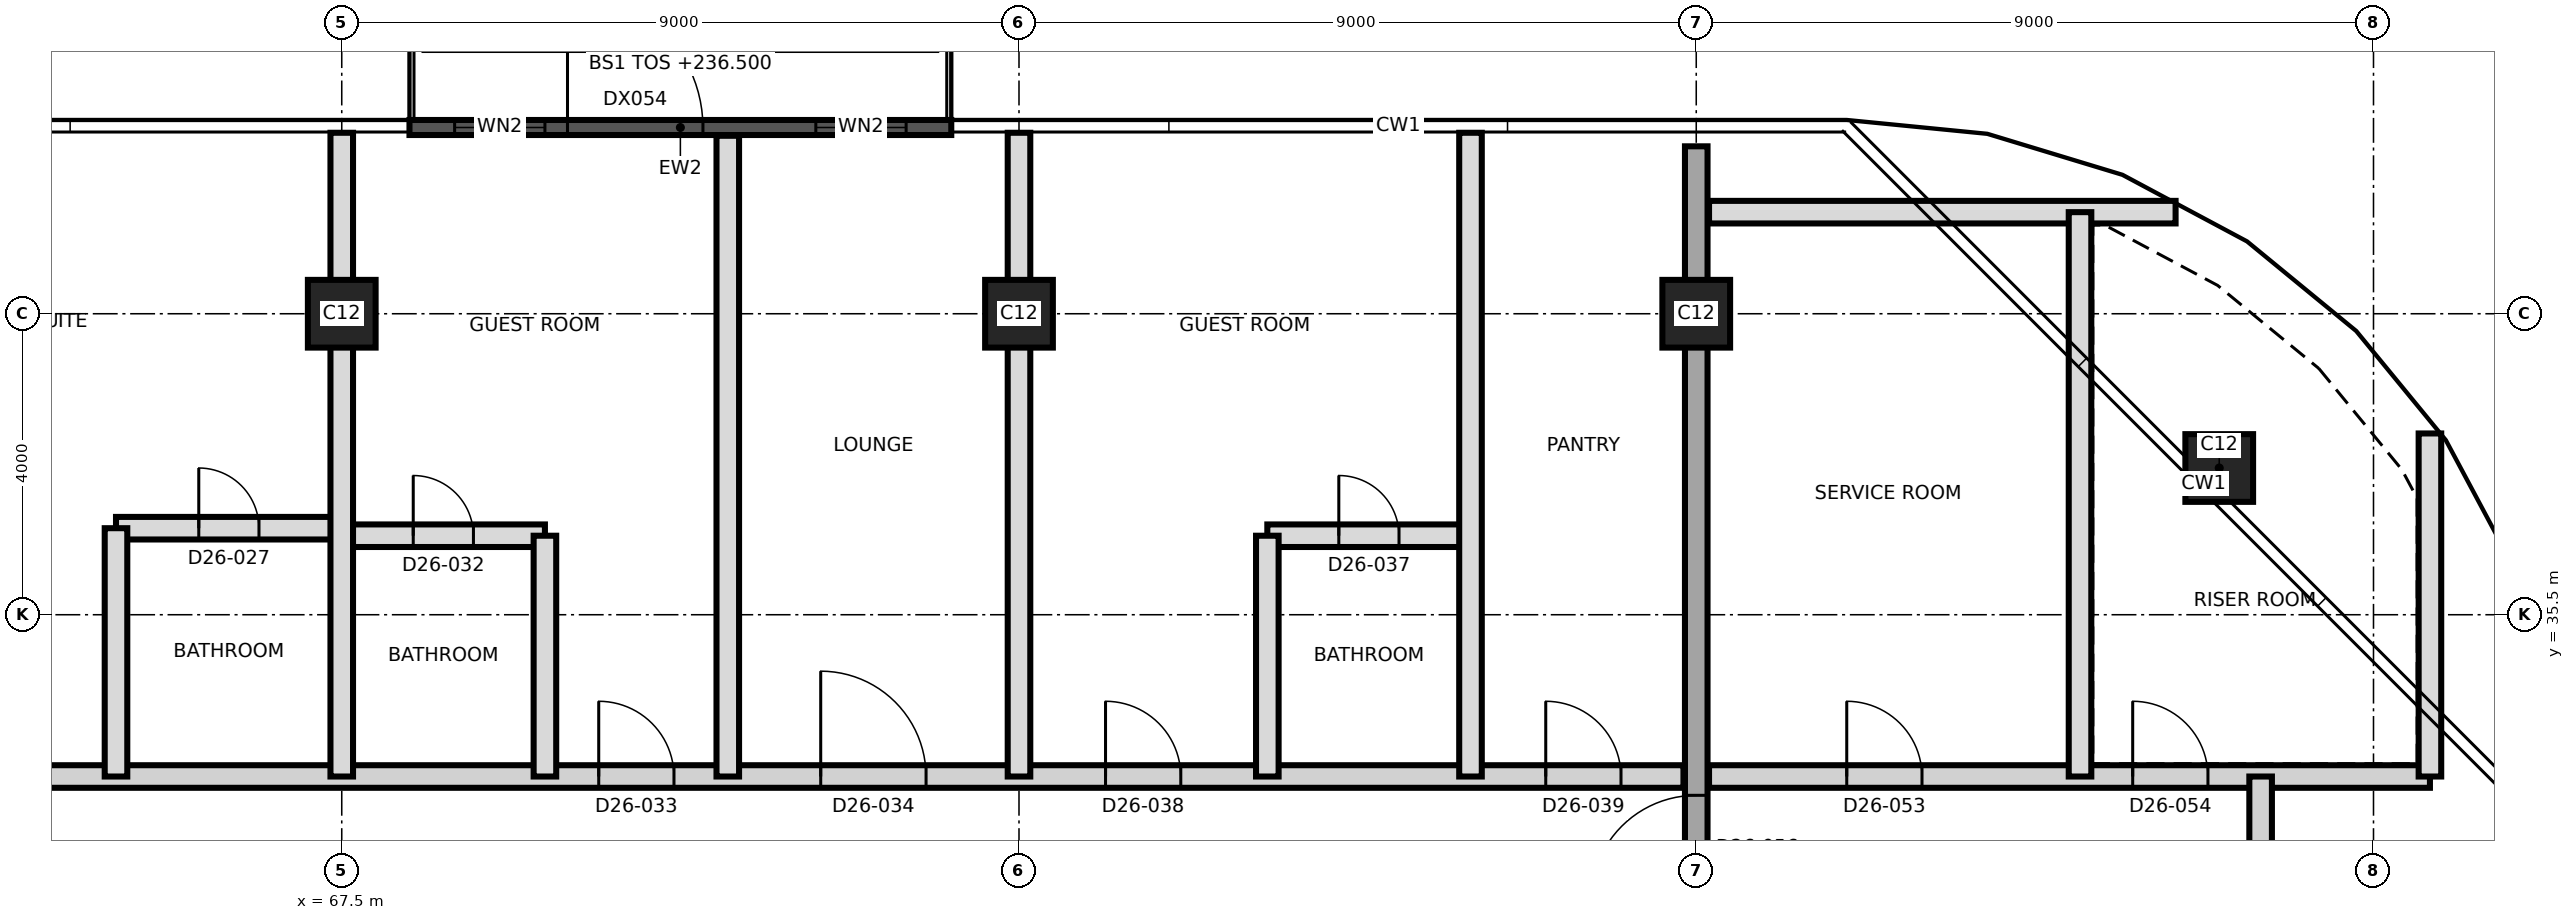
"""IFC4 building model, lengths in metres.
Left out: names, types, materials, properties, quantities, classifications, styles, units other than length and angle.
Written with IfcOpenShell. Run it as: python <this file> out.ifc"""

import sys

from ifc_helpers import new_model, si_unit, direction, frame, frame_2d, origin, origin_2d, place, context, subcontext, project, spatial, rectangle, extrude, element, fill, save


model = new_model("IFC4")
c1 = context("Model", 3, precision=1e-05, world=origin(), true_north=direction((0.0, 1.0)))
c2 = subcontext(c1, "Body", "Model", "MODEL_VIEW")
j1 = project(units=[si_unit("LENGTHUNIT", "METRE"), si_unit("PLANEANGLEUNIT", "RADIAN")], contexts=[c1])
p1 = place(None, origin())
s1 = spatial("IfcSite", under=j1, at=p1, CompositionType="ELEMENT")
p2 = place(p1, origin())
s2 = spatial("IfcBuilding", under=s1, at=p2, CompositionType="ELEMENT")
p3 = place(p2, frame((0.0, 0.0, 236.5)))
s3 = spatial("IfcBuildingStorey", under=s2, at=p3, CompositionType="ELEMENT", Elevation=236.5)
for number, where, z_axis, x_axis in (
    (1, (92.45, 37.45, 0.0), (0.0, 0.0, 1.0), (1.0, 0.0, 0.0)),
    (2, (67.5, 39.5, 0.0), (0.0, 0.0, 1.0), (1.0, 0.0, 0.0)),
    (3, (76.5, 39.5, 0.0), (0.0, 0.0, 1.0), (1.0, 0.0, 0.0)),
    (4, (85.5, 39.5, 0.0), (0.0, 0.0, 1.0), (1.0, 0.0, 0.0)),
):
    element("IfcColumn", number, at=place(p3, frame(where, z_axis=z_axis, x_axis=x_axis)), inside=s3, PredefinedType="COLUMN", context=c2, shape_type="SweptSolid", body=[
        extrude(rectangle(XDim=0.9, YDim=0.9, at=origin_2d()), origin(), (0.0, 0.0, 1.0), 3.7),
    ])
p4 = place(p3, frame((85.5, 19.275, 0.0), z_axis=(0.0, 0.0, 1.0), x_axis=(0.0, 1.0, 0.0)))
e5 = element("IfcWall", 5, at=p4, inside=s3, PredefinedType="SHEAR", context=c2, shape_type="SweptSolid", body=[
    extrude(rectangle(XDim=22.45, YDim=0.3, at=frame_2d((11.225, 0.0))), origin(), (0.0, 0.0, 1.0), 3.7),
])
p5 = place(p4, frame((12.425, 0.0, 0.0)))
e6 = element("IfcOpeningElement", 6, at=p5, cuts=e5, PredefinedType="OPENING", context=c2, shape_type="SweptSolid", body=[
    extrude(rectangle(XDim=1.4, YDim=2.1, at=frame_2d((0.7, 1.05))), frame((0.0, 0.16, 0.0), z_axis=(0.0, -1.0, 0.0), x_axis=(1.0, 0.0, 0.0)), (0.0, 0.0, 1.0), 0.32),
])
p6 = place(p3, frame((68.4, 41.975, 0.0), z_axis=(0.0, 0.0, 1.0), x_axis=(1.0, 0.0, 0.0)))
e7 = element("IfcWall", 7, at=p6, inside=s3, PredefinedType="SOLIDWALL", context=c2, shape_type="SweptSolid", body=[
    extrude(rectangle(XDim=7.2, YDim=0.2, at=frame_2d((3.6, 0.0))), origin(), (0.0, 0.0, 1.0), 3.4),
])
p7 = place(p6, frame((2.1, 0.0, 0.0)))
e8 = element("IfcOpeningElement", 8, at=p7, cuts=e7, PredefinedType="OPENING", context=c2, shape_type="SweptSolid", body=[
    extrude(rectangle(XDim=1.8, YDim=2.4, at=frame_2d((0.9, 1.2))), frame((0.0, 0.11, 0.0), z_axis=(0.0, -1.0, 0.0), x_axis=(1.0, 0.0, 0.0)), (0.0, 0.0, 1.0), 0.22),
])
p8 = place(p6, frame((5.4, 0.0, 0.9)))
e9 = element("IfcOpeningElement", 9, at=p8, cuts=e7, PredefinedType="OPENING", context=c2, shape_type="SweptSolid", body=[
    extrude(rectangle(XDim=1.2, YDim=2.1, at=frame_2d((0.6, 1.05))), frame((0.0, 0.11, 0.0), z_axis=(0.0, -1.0, 0.0), x_axis=(1.0, 0.0, 0.0)), (0.0, 0.0, 1.0), 0.22),
])
p9 = place(p6, frame((0.6, 0.0, 0.9)))
e10 = element("IfcOpeningElement", 10, at=p9, cuts=e7, PredefinedType="OPENING", context=c2, shape_type="SweptSolid", body=[
    extrude(rectangle(XDim=1.2, YDim=2.1, at=frame_2d((0.6, 1.05))), frame((0.0, 0.11, 0.0), z_axis=(0.0, -1.0, 0.0), x_axis=(1.0, 0.0, 0.0)), (0.0, 0.0, 1.0), 0.22),
])
p10 = place(p3, frame((58.55, 33.35, 0.0), z_axis=(0.0, 0.0, 1.0), x_axis=(1.0, 0.0, 0.0)))
e11 = element("IfcWall", 11, at=p10, inside=s3, PredefinedType="PARTITIONING", context=c2, shape_type="SweptSolid", body=[
    extrude(rectangle(XDim=26.78, YDim=0.3, at=frame_2d((13.39, 0.0))), origin(), (0.0, 0.0, 1.0), 3.4),
])
p11 = place(p10, frame((3.95, 0.0, 0.0)))
e12 = element("IfcOpeningElement", 12, at=p11, cuts=e11, PredefinedType="OPENING", context=c2, shape_type="SweptSolid", body=[
    extrude(rectangle(XDim=1.0, YDim=2.4, at=frame_2d((0.5, 1.2))), frame((0.0, 0.16, 0.0), z_axis=(0.0, -1.0, 0.0), x_axis=(1.0, 0.0, 0.0)), (0.0, 0.0, 1.0), 0.32),
])
p12 = place(p10, frame((12.365, 0.0, 0.0)))
e13 = element("IfcOpeningElement", 13, at=p12, cuts=e11, PredefinedType="OPENING", context=c2, shape_type="SweptSolid", body=[
    extrude(rectangle(XDim=1.0, YDim=2.1, at=frame_2d((0.5, 1.05))), frame((0.0, 0.16, 0.0), z_axis=(0.0, -1.0, 0.0), x_axis=(1.0, 0.0, 0.0)), (0.0, 0.0, 1.0), 0.32),
])
p13 = place(p10, frame((15.315, 0.0, 0.0)))
e14 = element("IfcOpeningElement", 14, at=p13, cuts=e11, PredefinedType="OPENING", context=c2, shape_type="SweptSolid", body=[
    extrude(rectangle(XDim=1.4, YDim=2.1, at=frame_2d((0.7, 1.05))), frame((0.0, 0.16, 0.0), z_axis=(0.0, -1.0, 0.0), x_axis=(1.0, 0.0, 0.0)), (0.0, 0.0, 1.0), 0.32),
])
p14 = place(p10, frame((19.1, 0.0, 0.0)))
e15 = element("IfcOpeningElement", 15, at=p14, cuts=e11, PredefinedType="OPENING", context=c2, shape_type="SweptSolid", body=[
    extrude(rectangle(XDim=1.0, YDim=2.1, at=frame_2d((0.5, 1.05))), frame((0.0, 0.16, 0.0), z_axis=(0.0, -1.0, 0.0), x_axis=(1.0, 0.0, 0.0)), (0.0, 0.0, 1.0), 0.32),
])
p15 = place(p10, frame((24.95, 0.0, 0.0)))
e16 = element("IfcOpeningElement", 16, at=p15, cuts=e11, PredefinedType="OPENING", context=c2, shape_type="SweptSolid", body=[
    extrude(rectangle(XDim=1.0, YDim=2.1, at=frame_2d((0.5, 1.05))), frame((0.0, 0.16, 0.0), z_axis=(0.0, -1.0, 0.0), x_axis=(1.0, 0.0, 0.0)), (0.0, 0.0, 1.0), 0.32),
])
p16 = place(p3, frame((85.67, 33.35, 0.0), z_axis=(0.0, 0.0, 1.0), x_axis=(1.0, 0.0, 0.0)))
e17 = element("IfcWall", 17, at=p16, inside=s3, PredefinedType="PARTITIONING", context=c2, shape_type="SweptSolid", body=[
    extrude(rectangle(XDim=9.58, YDim=0.3, at=frame_2d((4.79, 0.0))), origin(), (0.0, 0.0, 1.0), 3.4),
])
p17 = place(p16, frame((1.83, 0.0, 0.0)))
e18 = element("IfcOpeningElement", 18, at=p17, cuts=e17, PredefinedType="OPENING", context=c2, shape_type="SweptSolid", body=[
    extrude(rectangle(XDim=1.0, YDim=2.1, at=frame_2d((0.5, 1.05))), frame((0.0, 0.16, 0.0), z_axis=(0.0, -1.0, 0.0), x_axis=(1.0, 0.0, 0.0)), (0.0, 0.0, 1.0), 0.32),
])
p18 = place(p16, frame((5.63, 0.0, 0.0)))
e19 = element("IfcOpeningElement", 19, at=p18, cuts=e17, PredefinedType="OPENING", context=c2, shape_type="SweptSolid", body=[
    extrude(rectangle(XDim=1.0, YDim=2.1, at=frame_2d((0.5, 1.05))), frame((0.0, 0.16, 0.0), z_axis=(0.0, -1.0, 0.0), x_axis=(1.0, 0.0, 0.0)), (0.0, 0.0, 1.0), 0.32),
])
p19 = place(p3, frame((67.5, 36.55, 0.0), z_axis=(0.0, 0.0, 1.0), x_axis=(1.0, 0.0, 0.0)))
e20 = element("IfcWall", 20, at=p19, inside=s3, PredefinedType="PARTITIONING", context=c2, shape_type="SweptSolid", body=[
    extrude(rectangle(XDim=2.7, YDim=0.3, at=frame_2d((1.35, 0.0))), origin(), (0.0, 0.0, 1.0), 3.4),
])
p20 = place(p19, frame((0.95, 0.0, 0.0)))
e21 = element("IfcOpeningElement", 21, at=p20, cuts=e20, PredefinedType="OPENING", context=c2, shape_type="SweptSolid", body=[
    extrude(rectangle(XDim=0.8, YDim=2.1, at=frame_2d((0.4, 1.05))), frame((0.0, 0.16, 0.0), z_axis=(0.0, -1.0, 0.0), x_axis=(1.0, 0.0, 0.0)), (0.0, 0.0, 1.0), 0.32),
])
p21 = place(p3, frame((79.8, 36.55, 0.0), z_axis=(0.0, 0.0, 1.0), x_axis=(1.0, 0.0, 0.0)))
e22 = element("IfcWall", 22, at=p21, inside=s3, PredefinedType="PARTITIONING", context=c2, shape_type="SweptSolid", body=[
    extrude(rectangle(XDim=2.7, YDim=0.3, at=frame_2d((1.35, 0.0))), origin(), (0.0, 0.0, 1.0), 3.4),
])
p22 = place(p21, frame((0.95, 0.0, 0.0)))
e23 = element("IfcOpeningElement", 23, at=p22, cuts=e22, PredefinedType="OPENING", context=c2, shape_type="SweptSolid", body=[
    extrude(rectangle(XDim=0.8, YDim=2.1, at=frame_2d((0.4, 1.05))), frame((0.0, 0.16, 0.0), z_axis=(0.0, -1.0, 0.0), x_axis=(1.0, 0.0, 0.0)), (0.0, 0.0, 1.0), 0.32),
])
p23 = place(p3, frame((64.5, 36.65, 0.0), z_axis=(0.0, 0.0, 1.0), x_axis=(1.0, 0.0, 0.0)))
e24 = element("IfcWall", 24, at=p23, inside=s3, PredefinedType="PARTITIONING", context=c2, shape_type="SweptSolid", body=[
    extrude(rectangle(XDim=3.0, YDim=0.3, at=frame_2d((1.5, 0.0))), origin(), (0.0, 0.0, 1.0), 3.4),
])
p24 = place(p23, frame((1.1, 0.0, 0.0)))
e25 = element("IfcOpeningElement", 25, at=p24, cuts=e24, PredefinedType="OPENING", context=c2, shape_type="SweptSolid", body=[
    extrude(rectangle(XDim=0.8, YDim=2.1, at=frame_2d((0.4, 1.05))), frame((0.0, 0.16, 0.0), z_axis=(0.0, -1.0, 0.0), x_axis=(1.0, 0.0, 0.0)), (0.0, 0.0, 1.0), 0.32),
])
p25 = place(p3, frame((85.67, 40.85, 0.0), z_axis=(0.0, 0.0, 1.0), x_axis=(1.0, 0.0, 0.0)))
e26 = element("IfcWall", 26, at=p25, inside=s3, PredefinedType="PARTITIONING", context=c2, shape_type="SweptSolid", body=[
    extrude(rectangle(XDim=6.2, YDim=0.3, at=frame_2d((3.1, 0.0))), origin(), (0.0, 0.0, 1.0), 3.4),
])
p26 = place(p3, frame((64.5, 33.35, 0.0), z_axis=(0.0, 0.0, 1.0), x_axis=(0.0, 1.0, 0.0)))
e27 = element("IfcWall", 27, at=p26, inside=s3, PredefinedType="PARTITIONING", context=c2, shape_type="SweptSolid", body=[
    extrude(rectangle(XDim=3.3, YDim=0.3, at=frame_2d((1.65, 0.0))), origin(), (0.0, 0.0, 1.0), 3.4),
])
p27 = place(p3, frame((67.5, 33.35, 0.0), z_axis=(0.0, 0.0, 1.0), x_axis=(0.0, 1.0, 0.0)))
e28 = element("IfcWall", 28, at=p27, inside=s3, PredefinedType="PARTITIONING", context=c2, shape_type="SweptSolid", body=[
    extrude(rectangle(XDim=8.555, YDim=0.3, at=frame_2d((4.277, 0.0))), origin(), (0.0, 0.0, 1.0), 3.4),
])
p28 = place(p3, frame((70.2, 33.35, 0.0), z_axis=(0.0, 0.0, 1.0), x_axis=(0.0, 1.0, 0.0)))
e29 = element("IfcWall", 29, at=p28, inside=s3, PredefinedType="PARTITIONING", context=c2, shape_type="SweptSolid", body=[
    extrude(rectangle(XDim=3.2, YDim=0.3, at=frame_2d((1.6, 0.0))), origin(), (0.0, 0.0, 1.0), 3.4),
])
p29 = place(p3, frame((72.63, 33.35, 0.0), z_axis=(0.0, 0.0, 1.0), x_axis=(0.0, 1.0, 0.0)))
e30 = element("IfcWall", 30, at=p29, inside=s3, PredefinedType="PARTITIONING", context=c2, shape_type="SweptSolid", body=[
    extrude(rectangle(XDim=8.515, YDim=0.3, at=frame_2d((4.257, 0.0))), origin(), (0.0, 0.0, 1.0), 3.4),
])
p30 = place(p3, frame((76.5, 33.35, 0.0), z_axis=(0.0, 0.0, 1.0), x_axis=(0.0, 1.0, 0.0)))
e31 = element("IfcWall", 31, at=p30, inside=s3, PredefinedType="PARTITIONING", context=c2, shape_type="SweptSolid", body=[
    extrude(rectangle(XDim=8.555, YDim=0.3, at=frame_2d((4.277, 0.0))), origin(), (0.0, 0.0, 1.0), 3.4),
])
p31 = place(p3, frame((79.8, 33.35, 0.0), z_axis=(0.0, 0.0, 1.0), x_axis=(0.0, 1.0, 0.0)))
e32 = element("IfcWall", 32, at=p31, inside=s3, PredefinedType="PARTITIONING", context=c2, shape_type="SweptSolid", body=[
    extrude(rectangle(XDim=3.2, YDim=0.3, at=frame_2d((1.6, 0.0))), origin(), (0.0, 0.0, 1.0), 3.4),
])
p32 = place(p3, frame((82.5, 33.35, 0.0), z_axis=(0.0, 0.0, 1.0), x_axis=(0.0, 1.0, 0.0)))
e33 = element("IfcWall", 33, at=p32, inside=s3, PredefinedType="PARTITIONING", context=c2, shape_type="SweptSolid", body=[
    extrude(rectangle(XDim=8.555, YDim=0.3, at=frame_2d((4.277, 0.0))), origin(), (0.0, 0.0, 1.0), 3.4),
])
p33 = place(p3, frame((90.6, 33.35, 0.0), z_axis=(0.0, 0.0, 1.0), x_axis=(0.0, 1.0, 0.0)))
e34 = element("IfcWall", 34, at=p33, inside=s3, PredefinedType="PARTITIONING", context=c2, shape_type="SweptSolid", body=[
    extrude(rectangle(XDim=7.5, YDim=0.3, at=frame_2d((3.75, 0.0))), origin(), (0.0, 0.0, 1.0), 3.4),
])
p34 = place(p3, frame((93.0, 30.65, 0.0), z_axis=(0.0, 0.0, 1.0), x_axis=(0.0, 1.0, 0.0)))
e35 = element("IfcWall", 35, at=p34, inside=s3, PredefinedType="PARTITIONING", context=c2, shape_type="SweptSolid", body=[
    extrude(rectangle(XDim=2.7, YDim=0.3, at=frame_2d((1.35, 0.0))), origin(), (0.0, 0.0, 1.0), 3.4),
])
p35 = place(p3, frame((95.25, 33.35, 0.0), z_axis=(0.0, 0.0, 1.0), x_axis=(0.0, 1.0, 0.0)))
e36 = element("IfcWall", 36, at=p35, inside=s3, PredefinedType="PARTITIONING", context=c2, shape_type="SweptSolid", body=[
    extrude(rectangle(XDim=4.559, YDim=0.3, at=frame_2d((2.279, 0.0))), origin(), (0.0, 0.0, 1.0), 3.4),
])
p36 = place(p7, origin())
e37 = element("IfcDoor", 37, at=p36, inside=s3, OperationType="SINGLE_SWING_LEFT", PredefinedType="DOOR", context=c2, shape_type="SweptSolid", body=[
    extrude(rectangle(XDim=1.8, YDim=2.4, at=frame_2d((0.9, 1.2))), frame((0.0, 0.025, 0.0), z_axis=(0.0, -1.0, 0.0), x_axis=(1.0, 0.0, 0.0)), (0.0, 0.0, 1.0), 0.05),
])
fill(e8, e37)
p37 = place(p8, origin())
e38 = element("IfcWindow", 38, at=p37, inside=s3, PartitioningType="SINGLE_PANEL", PredefinedType="WINDOW", context=c2, shape_type="SweptSolid", body=[
    extrude(rectangle(XDim=1.2, YDim=2.1, at=frame_2d((0.6, 1.05))), frame((0.0, 0.03, 0.0), z_axis=(0.0, -1.0, 0.0), x_axis=(1.0, 0.0, 0.0)), (0.0, 0.0, 1.0), 0.06),
])
fill(e9, e38)
p38 = place(p9, origin())
e39 = element("IfcWindow", 39, at=p38, inside=s3, PartitioningType="SINGLE_PANEL", PredefinedType="WINDOW", context=c2, shape_type="SweptSolid", body=[
    extrude(rectangle(XDim=1.2, YDim=2.1, at=frame_2d((0.6, 1.05))), frame((0.0, 0.03, 0.0), z_axis=(0.0, -1.0, 0.0), x_axis=(1.0, 0.0, 0.0)), (0.0, 0.0, 1.0), 0.06),
])
fill(e10, e39)
p39 = place(p24, origin())
e40 = element("IfcDoor", 40, at=p39, inside=s3, OperationType="SINGLE_SWING_RIGHT", PredefinedType="DOOR", context=c2, shape_type="SweptSolid", body=[
    extrude(rectangle(XDim=0.8, YDim=2.1, at=frame_2d((0.4, 1.05))), frame((0.0, 0.025, 0.0), z_axis=(0.0, -1.0, 0.0), x_axis=(1.0, 0.0, 0.0)), (0.0, 0.0, 1.0), 0.05),
])
fill(e25, e40)
p40 = place(p20, origin())
e41 = element("IfcDoor", 41, at=p40, inside=s3, OperationType="SINGLE_SWING_LEFT", PredefinedType="DOOR", context=c2, shape_type="SweptSolid", body=[
    extrude(rectangle(XDim=0.8, YDim=2.1, at=frame_2d((0.4, 1.05))), frame((0.0, 0.025, 0.0), z_axis=(0.0, -1.0, 0.0), x_axis=(1.0, 0.0, 0.0)), (0.0, 0.0, 1.0), 0.05),
])
fill(e21, e41)
p41 = place(p12, origin())
e42 = element("IfcDoor", 42, at=p41, inside=s3, OperationType="SINGLE_SWING_LEFT", PredefinedType="DOOR", context=c2, shape_type="SweptSolid", body=[
    extrude(rectangle(XDim=1.0, YDim=2.1, at=frame_2d((0.5, 1.05))), frame((0.0, 0.025, 0.0), z_axis=(0.0, -1.0, 0.0), x_axis=(1.0, 0.0, 0.0)), (0.0, 0.0, 1.0), 0.05),
])
fill(e13, e42)
p42 = place(p13, origin())
e43 = element("IfcDoor", 43, at=p42, inside=s3, OperationType="SINGLE_SWING_RIGHT", PredefinedType="DOOR", context=c2, shape_type="SweptSolid", body=[
    extrude(rectangle(XDim=1.4, YDim=2.1, at=frame_2d((0.7, 1.05))), frame((0.0, 0.025, 0.0), z_axis=(0.0, -1.0, 0.0), x_axis=(1.0, 0.0, 0.0)), (0.0, 0.0, 1.0), 0.05),
])
fill(e14, e43)
p43 = place(p22, origin())
e44 = element("IfcDoor", 44, at=p43, inside=s3, OperationType="SINGLE_SWING_LEFT", PredefinedType="DOOR", context=c2, shape_type="SweptSolid", body=[
    extrude(rectangle(XDim=0.8, YDim=2.1, at=frame_2d((0.4, 1.05))), frame((0.0, 0.025, 0.0), z_axis=(0.0, -1.0, 0.0), x_axis=(1.0, 0.0, 0.0)), (0.0, 0.0, 1.0), 0.05),
])
fill(e23, e44)
p44 = place(p14, origin())
e45 = element("IfcDoor", 45, at=p44, inside=s3, OperationType="SINGLE_SWING_RIGHT", PredefinedType="DOOR", context=c2, shape_type="SweptSolid", body=[
    extrude(rectangle(XDim=1.0, YDim=2.1, at=frame_2d((0.5, 1.05))), frame((0.0, 0.025, 0.0), z_axis=(0.0, -1.0, 0.0), x_axis=(1.0, 0.0, 0.0)), (0.0, 0.0, 1.0), 0.05),
])
fill(e15, e45)
p45 = place(p15, origin())
e46 = element("IfcDoor", 46, at=p45, inside=s3, OperationType="SINGLE_SWING_LEFT", PredefinedType="DOOR", context=c2, shape_type="SweptSolid", body=[
    extrude(rectangle(XDim=1.0, YDim=2.1, at=frame_2d((0.5, 1.05))), frame((0.0, 0.025, 0.0), z_axis=(0.0, -1.0, 0.0), x_axis=(1.0, 0.0, 0.0)), (0.0, 0.0, 1.0), 0.05),
])
fill(e16, e46)
p46 = place(p17, origin())
e47 = element("IfcDoor", 47, at=p46, inside=s3, OperationType="SINGLE_SWING_LEFT", PredefinedType="DOOR", context=c2, shape_type="SweptSolid", body=[
    extrude(rectangle(XDim=1.0, YDim=2.1, at=frame_2d((0.5, 1.05))), frame((0.0, 0.025, 0.0), z_axis=(0.0, -1.0, 0.0), x_axis=(1.0, 0.0, 0.0)), (0.0, 0.0, 1.0), 0.05),
])
fill(e18, e47)
p47 = place(p18, origin())
e48 = element("IfcDoor", 48, at=p47, inside=s3, OperationType="SINGLE_SWING_RIGHT", PredefinedType="DOOR", context=c2, shape_type="SweptSolid", body=[
    extrude(rectangle(XDim=1.0, YDim=2.1, at=frame_2d((0.5, 1.05))), frame((0.0, 0.025, 0.0), z_axis=(0.0, -1.0, 0.0), x_axis=(1.0, 0.0, 0.0)), (0.0, 0.0, 1.0), 0.05),
])
fill(e19, e48)
p48 = place(p5, origin())
e49 = element("IfcDoor", 49, at=p48, inside=s3, OperationType="SINGLE_SWING_RIGHT", PredefinedType="DOOR", context=c2, shape_type="SweptSolid", body=[
    extrude(rectangle(XDim=1.4, YDim=2.1, at=frame_2d((0.7, 1.05))), frame((0.0, 0.025, 0.0), z_axis=(0.0, -1.0, 0.0), x_axis=(1.0, 0.0, 0.0)), (0.0, 0.0, 1.0), 0.05),
])
fill(e6, e49)
save(model, sys.argv[1])
